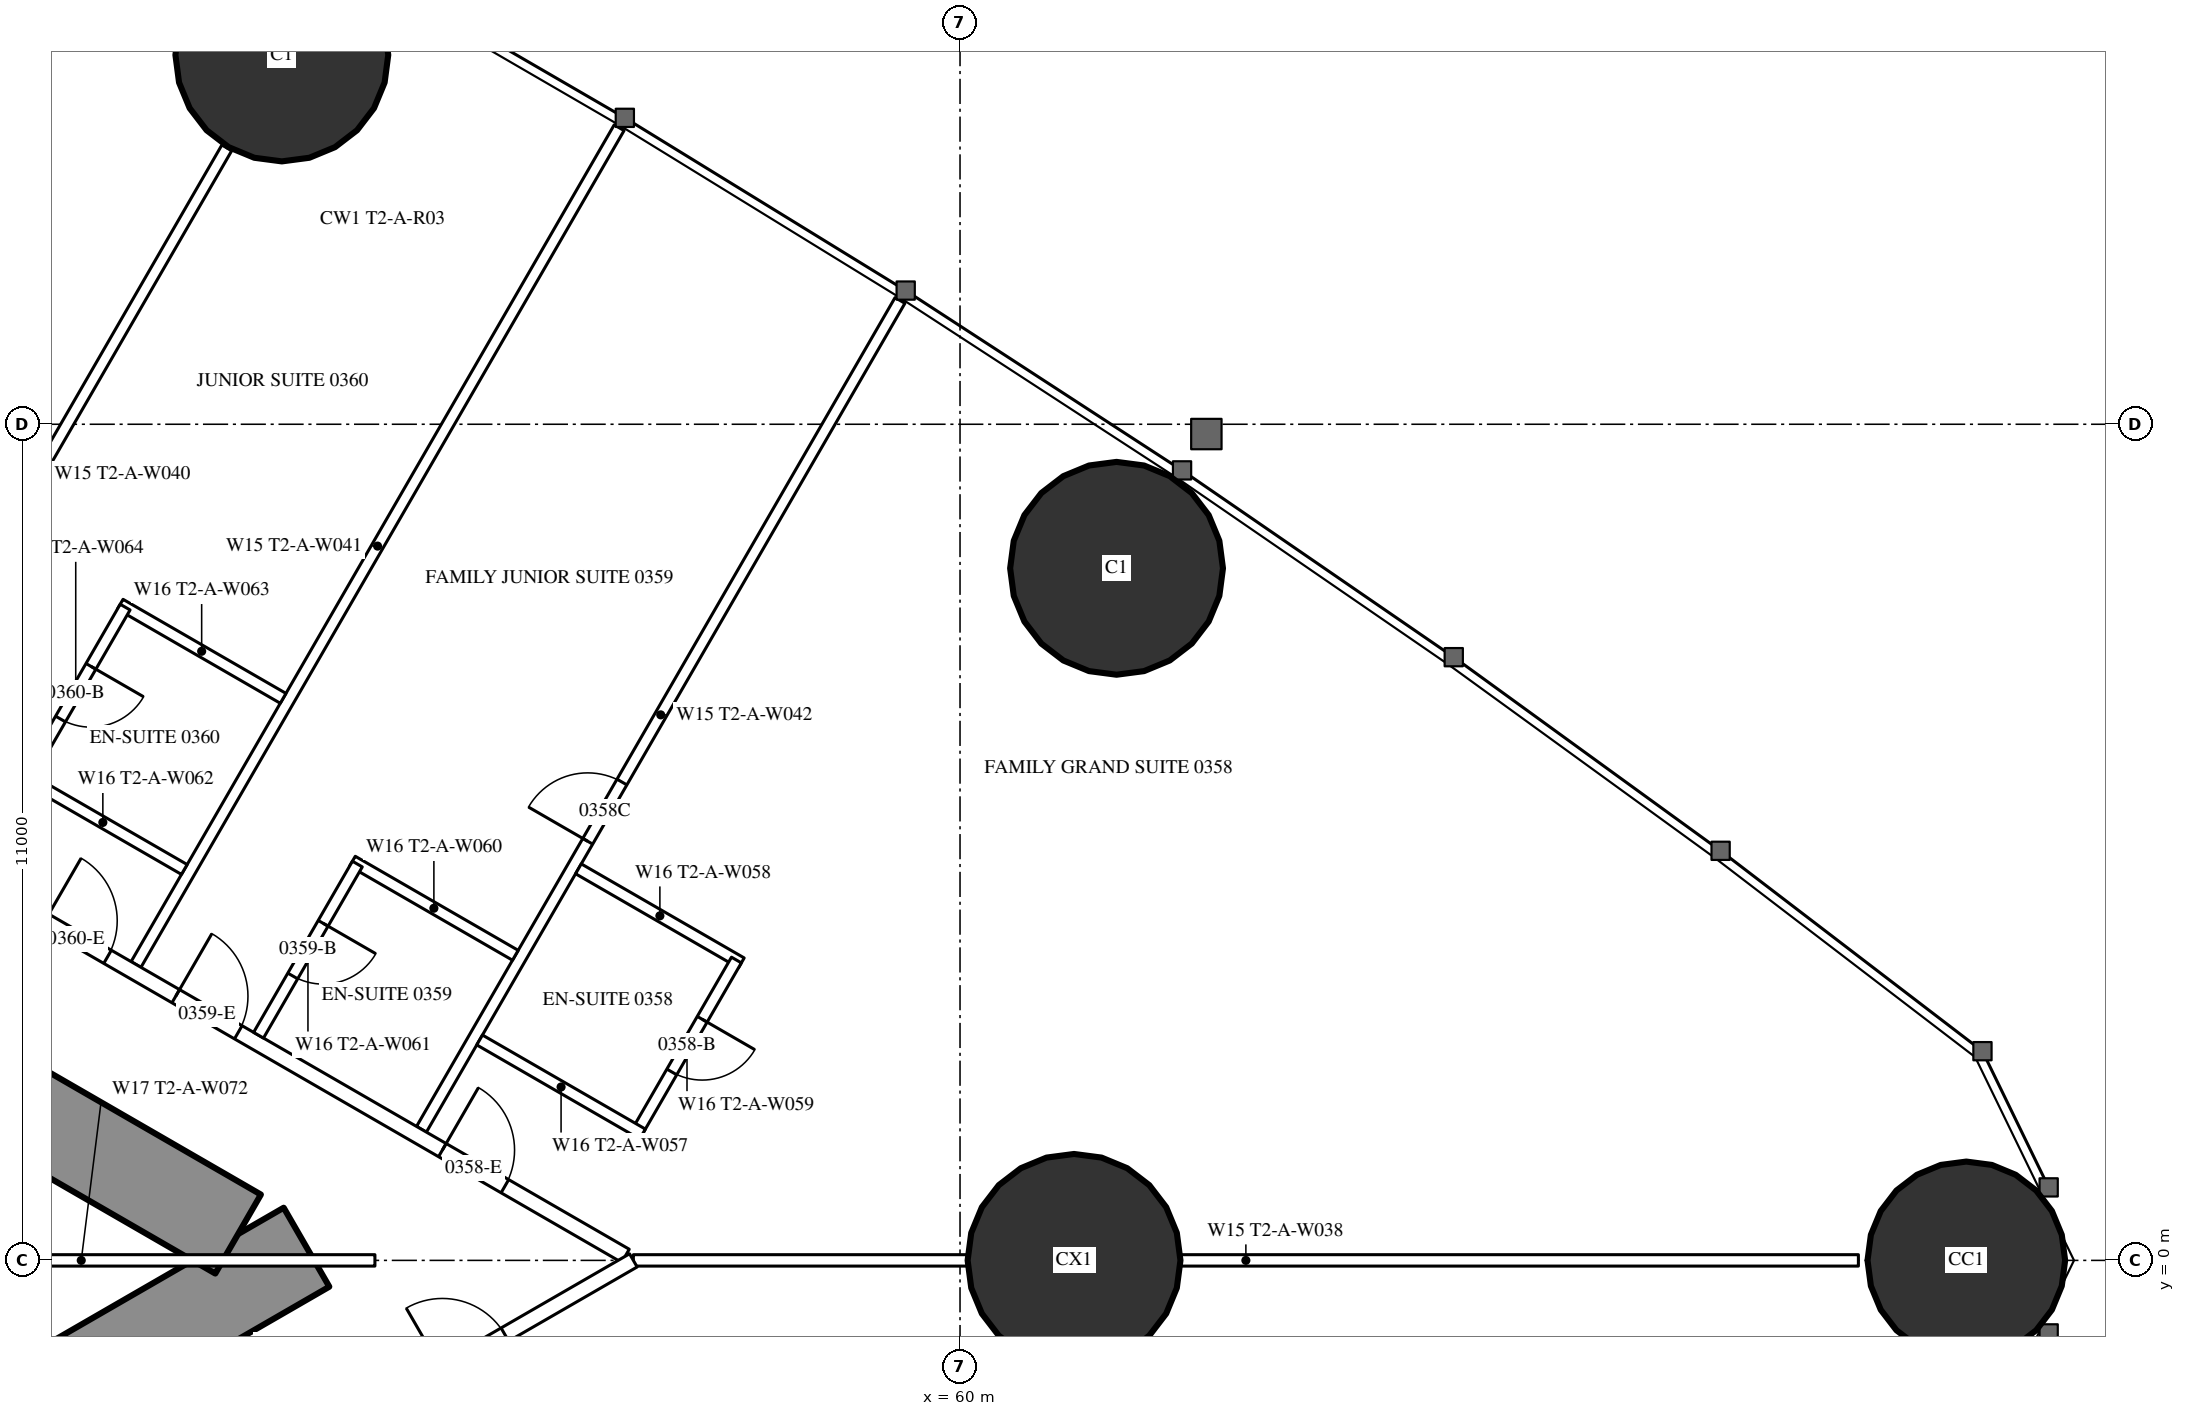
"""IFC4 building model, lengths in metres.
Left out: names, types, materials, properties, quantities, classifications, styles, units other than length and angle.
Written with IfcOpenShell. Run it as: python <this file> out.ifc"""

import sys

from ifc_helpers import new_model, si_unit, direction, frame, frame_2d, origin, origin_2d, place, context, subcontext, project, spatial, rectangle, hollow_circle, extrude, element, fill, save


model = new_model("IFC4")
c1 = context("Model", 3, precision=1e-05, world=origin(), true_north=direction((0.0, 1.0)))
c2 = subcontext(c1, "Body", "Model", "MODEL_VIEW")
j1 = project(units=[si_unit("LENGTHUNIT", "METRE"), si_unit("PLANEANGLEUNIT", "RADIAN")], contexts=[c1])
p1 = place(None, origin())
s1 = spatial("IfcSite", under=j1, at=p1, CompositionType="ELEMENT")
p2 = place(p1, origin())
s2 = spatial("IfcBuilding", under=s1, at=p2, CompositionType="ELEMENT")
p3 = place(p2, frame((0.0, 0.0, 18.0)))
s3 = spatial("IfcBuildingStorey", under=s2, at=p3, CompositionType="ELEMENT", Elevation=18.0)
p4 = place(p3, frame((73.239, 0.0, 0.0), z_axis=(0.0, 0.0, 1.0), x_axis=(1.0, 0.0, 0.0)))
e1 = element("IfcColumn", 1, at=p4, inside=s3, PredefinedType="COLUMN", context=c2, shape_type="SweptSolid", body=[
    extrude(hollow_circle(Radius=1.3, WallThickness=0.1, at=origin_2d()), origin(), (0.0, 0.0, 1.0), 3.5),
])
for number, where, z_axis, x_axis in (
    (2, (62.059, 9.105, 0.0), (0.0, 0.0, 1.0), (1.0, 0.0, 0.0)),
    (3, (51.078, 15.858, 0.0), (0.0, 0.0, 1.0), (1.0, 0.0, 0.0)),
):
    element("IfcColumn", number, at=place(p3, frame(where, z_axis=z_axis, x_axis=x_axis)), inside=s3, PredefinedType="COLUMN", context=c2, shape_type="SweptSolid", body=[
        extrude(hollow_circle(Radius=1.4, WallThickness=0.12, at=origin_2d()), origin(), (0.0, 0.0, 1.0), 3.5),
    ])
p5 = place(p3, frame((61.5, 0.0, 0.0), z_axis=(0.0, 0.0, 1.0), x_axis=(1.0, 0.0, 0.0)))
e4 = element("IfcColumn", 4, at=p5, inside=s3, PredefinedType="COLUMN", context=c2, shape_type="SweptSolid", body=[
    extrude(hollow_circle(Radius=1.4, WallThickness=0.1, at=origin_2d()), origin(), (0.0, 0.0, 1.0), 3.5),
])
p6 = place(p3, frame((27.2, -13.8, 0.0), z_axis=(0.0, 0.0, 1.0), x_axis=(0.866027159892, 0.499996958321, 0.0)))
e5 = element("IfcWall", 5, at=p6, inside=s3, PredefinedType="SHEAR", context=c2, shape_type="SweptSolid", body=[
    extrude(rectangle(XDim=27.947, YDim=1.2, at=frame_2d((13.973, 0.0))), origin(), (0.0, 0.0, 1.0), 3.5),
])
p7 = place(p6, frame((4.6, 0.0, 0.0)))
e6 = element("IfcOpeningElement", 6, at=p7, cuts=e5, PredefinedType="OPENING", context=c2, shape_type="SweptSolid", body=[
    extrude(rectangle(XDim=1.0, YDim=2.2, at=frame_2d((0.5, 1.1))), frame((0.0, 0.61, 0.0), z_axis=(0.0, -1.0, 0.0), x_axis=(1.0, 0.0, 0.0)), (0.0, 0.0, 1.0), 1.22),
])
p8 = place(p6, frame((13.395, 0.0, 0.0)))
e7 = element("IfcOpeningElement", 7, at=p8, cuts=e5, PredefinedType="OPENING", context=c2, shape_type="SweptSolid", body=[
    extrude(rectangle(XDim=1.8, YDim=2.2, at=frame_2d((0.9, 1.1))), frame((0.0, 0.61, 0.0), z_axis=(0.0, -1.0, 0.0), x_axis=(1.0, 0.0, 0.0)), (0.0, 0.0, 1.0), 1.22),
])
p9 = place(p3, frame((27.2, 13.8, 0.0), z_axis=(0.0, 0.0, 1.0), x_axis=(0.866024515034, -0.500001539357, 0.0)))
e8 = element("IfcWall", 8, at=p9, inside=s3, PredefinedType="SHEAR", context=c2, shape_type="SweptSolid", body=[
    extrude(rectangle(XDim=26.907, YDim=1.2, at=frame_2d((13.454, 0.0))), origin(), (0.0, 0.0, 1.0), 3.5),
])
p10 = place(p9, frame((4.6, 0.0, 0.0)))
e9 = element("IfcOpeningElement", 9, at=p10, cuts=e8, PredefinedType="OPENING", context=c2, shape_type="SweptSolid", body=[
    extrude(rectangle(XDim=1.0, YDim=2.2, at=frame_2d((0.5, 1.1))), frame((0.0, 0.61, 0.0), z_axis=(0.0, -1.0, 0.0), x_axis=(1.0, 0.0, 0.0)), (0.0, 0.0, 1.0), 1.22),
])
p11 = place(p9, frame((13.395, 0.0, 0.0)))
e10 = element("IfcOpeningElement", 10, at=p11, cuts=e8, PredefinedType="OPENING", context=c2, shape_type="SweptSolid", body=[
    extrude(rectangle(XDim=1.8, YDim=2.2, at=frame_2d((0.9, 1.1))), frame((0.0, 0.61, 0.0), z_axis=(0.0, -1.0, 0.0), x_axis=(1.0, 0.0, 0.0)), (0.0, 0.0, 1.0), 1.22),
])
p12 = place(p3, frame((45.403, 6.062, 0.0), z_axis=(0.0, 0.0, 1.0), x_axis=(0.500013434677, 0.866017647131, 0.0)))
e11 = element("IfcWall", 11, at=p12, inside=s3, PredefinedType="PARTITIONING", context=c2, shape_type="SweptSolid", body=[
    extrude(rectangle(XDim=9.902, YDim=0.15, at=frame_2d((4.951, 0.0))), origin(), (0.0, 0.0, 1.0), 2.25),
])
p13 = place(p3, frame((49.159, 3.893, 0.0), z_axis=(0.0, 0.0, 1.0), x_axis=(0.499995664361, 0.866027906952, 0.0)))
e12 = element("IfcWall", 12, at=p13, inside=s3, PredefinedType="PARTITIONING", context=c2, shape_type="SweptSolid", body=[
    extrude(rectangle(XDim=12.711, YDim=0.15, at=frame_2d((6.356, 0.0))), origin(), (0.0, 0.0, 1.0), 3.25),
])
p14 = place(p3, frame((52.915, 1.725, 0.0), z_axis=(0.0, 0.0, 1.0), x_axis=(0.499997163113, 0.866027041656, 0.0)))
e13 = element("IfcWall", 13, at=p14, inside=s3, PredefinedType="PARTITIONING", context=c2, shape_type="SweptSolid", body=[
    extrude(rectangle(XDim=12.591, YDim=0.15, at=frame_2d((6.295, 0.0))), origin(), (0.0, 0.0, 1.0), 3.25),
])
p15 = place(p14, frame((4.375, 0.0, 0.0)))
e14 = element("IfcOpeningElement", 14, at=p15, cuts=e13, PredefinedType="OPENING", context=c2, shape_type="SweptSolid", body=[
    extrude(rectangle(XDim=0.9, YDim=2.2, at=frame_2d((0.45, 1.1))), frame((0.0, 0.085, 0.0), z_axis=(0.0, -1.0, 0.0), x_axis=(1.0, 0.0, 0.0)), (0.0, 0.0, 1.0), 0.17),
])
p16 = place(p3, frame((55.702, 0.0, 0.0), z_axis=(0.0, 0.0, 1.0), x_axis=(1.0, 0.0, 0.0)))
e15 = element("IfcWall", 15, at=p16, inside=s3, PredefinedType="PARTITIONING", context=c2, shape_type="SweptSolid", body=[
    extrude(rectangle(XDim=16.117, YDim=0.15, at=frame_2d((8.059, 0.0))), origin(), (0.0, 0.0, 1.0), 2.25),
])
p17 = place(p3, frame((36.834, 10.894, 0.0), z_axis=(0.0, 0.0, 1.0), x_axis=(0.866028157229, -0.499995230863, 0.0)))
e16 = element("IfcWall", 16, at=p17, inside=s3, PredefinedType="PARTITIONING", context=c2, shape_type="SweptSolid", body=[
    extrude(rectangle(XDim=21.667, YDim=0.2, at=frame_2d((10.833, 0.0))), origin(), (0.0, 0.0, 1.0), 3.25),
])
p18 = place(p17, frame((18.885, 0.0, 0.0)))
e17 = element("IfcOpeningElement", 17, at=p18, cuts=e16, PredefinedType="OPENING", context=c2, shape_type="SweptSolid", body=[
    extrude(rectangle(XDim=0.95, YDim=2.2, at=frame_2d((0.475, 1.1))), frame((0.0, 0.11, 0.0), z_axis=(0.0, -1.0, 0.0), x_axis=(1.0, 0.0, 0.0)), (0.0, 0.0, 1.0), 0.22),
])
p19 = place(p17, frame((14.835, 0.0, 0.0)))
e18 = element("IfcOpeningElement", 18, at=p19, cuts=e16, PredefinedType="OPENING", context=c2, shape_type="SweptSolid", body=[
    extrude(rectangle(XDim=0.95, YDim=2.2, at=frame_2d((0.475, 1.1))), frame((0.0, 0.11, 0.0), z_axis=(0.0, -1.0, 0.0), x_axis=(1.0, 0.0, 0.0)), (0.0, 0.0, 1.0), 0.22),
])
p20 = place(p17, frame((12.85, 0.0, 0.0)))
e19 = element("IfcOpeningElement", 19, at=p20, cuts=e16, PredefinedType="OPENING", context=c2, shape_type="SweptSolid", body=[
    extrude(rectangle(XDim=0.95, YDim=2.2, at=frame_2d((0.475, 1.1))), frame((0.0, 0.11, 0.0), z_axis=(0.0, -1.0, 0.0), x_axis=(1.0, 0.0, 0.0)), (0.0, 0.0, 1.0), 0.22),
])
p21 = place(p17, frame((1.542, 0.0, 0.0)))
e20 = element("IfcOpeningElement", 20, at=p21, cuts=e16, PredefinedType="OPENING", context=c2, shape_type="SweptSolid", body=[
    extrude(rectangle(XDim=0.95, YDim=2.2, at=frame_2d((0.475, 1.1))), frame((0.0, 0.11, 0.0), z_axis=(0.0, -1.0, 0.0), x_axis=(1.0, 0.0, 0.0)), (0.0, 0.0, 1.0), 0.22),
])
p22 = place(p3, frame((49.131, -3.794, 0.0), z_axis=(0.0, 0.0, 1.0), x_axis=(0.866030732979, 0.499990769451, 0.0)))
e21 = element("IfcWall", 21, at=p22, inside=s3, PredefinedType="PARTITIONING", context=c2, shape_type="SweptSolid", body=[
    extrude(rectangle(XDim=7.588, YDim=0.2, at=frame_2d((3.794, 0.0))), origin(), (0.0, 0.0, 1.0), 3.25),
])
p23 = place(p22, frame((2.986, 0.0, 0.0)))
e22 = element("IfcOpeningElement", 22, at=p23, cuts=e21, PredefinedType="OPENING", context=c2, shape_type="SweptSolid", body=[
    extrude(rectangle(XDim=0.95, YDim=2.2, at=frame_2d((0.475, 1.1))), frame((0.0, 0.11, 0.0), z_axis=(0.0, -1.0, 0.0), x_axis=(1.0, 0.0, 0.0)), (0.0, 0.0, 1.0), 0.22),
])
p24 = place(p22, frame((4.686, 0.0, 0.0)))
e23 = element("IfcOpeningElement", 23, at=p24, cuts=e21, PredefinedType="OPENING", context=c2, shape_type="SweptSolid", body=[
    extrude(rectangle(XDim=0.95, YDim=2.2, at=frame_2d((0.475, 1.1))), frame((0.0, 0.11, 0.0), z_axis=(0.0, -1.0, 0.0), x_axis=(1.0, 0.0, 0.0)), (0.0, 0.0, 1.0), 0.22),
])
p25 = place(p3, frame((54.98, 5.151, 0.0), z_axis=(0.0, 0.0, 1.0), x_axis=(0.86604923931, -0.499958713387, 0.0)))
e24 = element("IfcWall", 24, at=p25, inside=s3, PredefinedType="PARTITIONING", context=c2, shape_type="SweptSolid", body=[
    extrude(rectangle(XDim=2.475, YDim=0.15, at=frame_2d((1.237, 0.0))), origin(), (0.0, 0.0, 1.0), 3.25),
])
p26 = place(p3, frame((55.758, 1.7, 0.0), z_axis=(0.0, 0.0, 1.0), x_axis=(0.500006934395, 0.866021400173, 0.0)))
e25 = element("IfcWall", 25, at=p26, inside=s3, PredefinedType="PARTITIONING", context=c2, shape_type="SweptSolid", body=[
    extrude(rectangle(XDim=2.6, YDim=0.15, at=frame_2d((1.3, 0.0))), origin(), (0.0, 0.0, 1.0), 3.25),
])
p27 = place(p26, frame((0.9, 0.0, 0.0)))
e26 = element("IfcOpeningElement", 26, at=p27, cuts=e25, PredefinedType="OPENING", context=c2, shape_type="SweptSolid", body=[
    extrude(rectangle(XDim=0.8, YDim=2.2, at=frame_2d((0.4, 1.1))), frame((0.0, 0.085, 0.0), z_axis=(0.0, -1.0, 0.0), x_axis=(1.0, 0.0, 0.0)), (0.0, 0.0, 1.0), 0.17),
])
for number, where, z_axis, x_axis in (
    (27, (53.68, 2.9, 0.0), (0.0, 0.0, 1.0), (0.866, -0.5, 0.0)),
    (28, (52.006, 5.251, 0.0), (0.0, 0.0, 1.0), (0.866, -0.5, 0.0)),
):
    element("IfcWall", number, at=place(p3, frame(where, z_axis=z_axis, x_axis=x_axis)), inside=s3, PredefinedType="PARTITIONING", context=c2, shape_type="SweptSolid", body=[
        extrude(rectangle(XDim=2.475, YDim=0.15, at=frame_2d((1.237, 0.0))), origin(), (0.0, 0.0, 1.0), 3.25),
    ])
p28 = place(p3, frame((50.771, 2.962, 0.0), z_axis=(0.0, 0.0, 1.0), x_axis=(0.500006934395, 0.866021400173, 0.0)))
e29 = element("IfcWall", 29, at=p28, inside=s3, PredefinedType="PARTITIONING", context=c2, shape_type="SweptSolid", body=[
    extrude(rectangle(XDim=2.6, YDim=0.15, at=frame_2d((1.3, 0.0))), origin(), (0.0, 0.0, 1.0), 3.25),
])
p29 = place(p28, frame((0.9, 0.0, 0.0)))
e30 = element("IfcOpeningElement", 30, at=p29, cuts=e29, PredefinedType="OPENING", context=c2, shape_type="SweptSolid", body=[
    extrude(rectangle(XDim=0.8, YDim=2.2, at=frame_2d((0.4, 1.1))), frame((0.0, 0.085, 0.0), z_axis=(0.0, -1.0, 0.0), x_axis=(1.0, 0.0, 0.0)), (0.0, 0.0, 1.0), 0.17),
])
p30 = place(p3, frame((48.951, 8.632, 0.0), z_axis=(0.0, 0.0, 1.0), x_axis=(0.866006523861, -0.500032699561, 0.0)))
e31 = element("IfcWall", 31, at=p30, inside=s3, PredefinedType="PARTITIONING", context=c2, shape_type="SweptSolid", body=[
    extrude(rectangle(XDim=2.475, YDim=0.15, at=frame_2d((1.237, 0.0))), origin(), (0.0, 0.0, 1.0), 3.25),
])
p31 = place(p3, frame((47.716, 6.343, 0.0), z_axis=(0.0, 0.0, 1.0), x_axis=(0.500006934395, 0.866021400173, 0.0)))
e32 = element("IfcWall", 32, at=p31, inside=s3, PredefinedType="PARTITIONING", context=c2, shape_type="SweptSolid", body=[
    extrude(rectangle(XDim=2.6, YDim=0.15, at=frame_2d((1.3, 0.0))), origin(), (0.0, 0.0, 1.0), 3.25),
])
p32 = place(p31, frame((0.9, 0.0, 0.0)))
e33 = element("IfcOpeningElement", 33, at=p32, cuts=e32, PredefinedType="OPENING", context=c2, shape_type="SweptSolid", body=[
    extrude(rectangle(XDim=0.8, YDim=2.2, at=frame_2d((0.4, 1.1))), frame((0.0, 0.085, 0.0), z_axis=(0.0, -1.0, 0.0), x_axis=(1.0, 0.0, 0.0)), (0.0, 0.0, 1.0), 0.17),
])
p33 = place(p3, frame((47.651, 6.38, 0.0), z_axis=(0.0, 0.0, 1.0), x_axis=(0.866031185235, -0.4999899861, 0.0)))
e34 = element("IfcWall", 34, at=p33, inside=s3, PredefinedType="PARTITIONING", context=c2, shape_type="SweptSolid", body=[
    extrude(rectangle(XDim=2.475, YDim=0.15, at=frame_2d((1.238, 0.0))), origin(), (0.0, 0.0, 1.0), 3.25),
])
p34 = place(p3, frame((44.575, 0.0, 0.0), z_axis=(0.0, 0.0, 1.0), x_axis=(1.0, 0.0, 0.0)))
e35 = element("IfcWall", 35, at=p34, inside=s3, PredefinedType="PARTITIONING", context=c2, shape_type="SweptSolid", body=[
    extrude(rectangle(XDim=7.727, YDim=0.15, at=frame_2d((3.864, 0.0))), origin(), (0.0, 0.0, 1.0), 2.25),
])
p35 = place(p24, origin())
e36 = element("IfcDoor", 36, at=p35, inside=s3, OperationType="SINGLE_SWING_LEFT", PredefinedType="DOOR", context=c2, shape_type="SweptSolid", body=[
    extrude(rectangle(XDim=0.95, YDim=2.2, at=frame_2d((0.475, 1.1))), frame((0.0, 0.025, 0.0), z_axis=(0.0, -1.0, 0.0), x_axis=(1.0, 0.0, 0.0)), (0.0, 0.0, 1.0), 0.05),
])
fill(e23, e36)
p36 = place(p27, origin())
e37 = element("IfcDoor", 37, at=p36, inside=s3, OperationType="SINGLE_SWING_RIGHT", PredefinedType="DOOR", context=c2, shape_type="SweptSolid", body=[
    extrude(rectangle(XDim=0.8, YDim=2.2, at=frame_2d((0.4, 1.1))), frame((0.0, 0.025, 0.0), z_axis=(0.0, -1.0, 0.0), x_axis=(1.0, 0.0, 0.0)), (0.0, 0.0, 1.0), 0.05),
])
fill(e26, e37)
p37 = place(p18, origin())
e38 = element("IfcDoor", 38, at=p37, inside=s3, OperationType="SINGLE_SWING_LEFT", PredefinedType="DOOR", context=c2, shape_type="SweptSolid", body=[
    extrude(rectangle(XDim=0.95, YDim=2.2, at=frame_2d((0.475, 1.1))), frame((0.0, 0.025, 0.0), z_axis=(0.0, -1.0, 0.0), x_axis=(1.0, 0.0, 0.0)), (0.0, 0.0, 1.0), 0.05),
])
fill(e17, e38)
p38 = place(p29, origin())
e39 = element("IfcDoor", 39, at=p38, inside=s3, OperationType="SINGLE_SWING_RIGHT", PredefinedType="DOOR", context=c2, shape_type="SweptSolid", body=[
    extrude(rectangle(XDim=0.8, YDim=2.2, at=frame_2d((0.4, 1.1))), frame((0.0, 0.025, 0.0), z_axis=(0.0, -1.0, 0.0), x_axis=(1.0, 0.0, 0.0)), (0.0, 0.0, 1.0), 0.05),
])
fill(e30, e39)
p39 = place(p19, origin())
e40 = element("IfcDoor", 40, at=p39, inside=s3, OperationType="SINGLE_SWING_LEFT", PredefinedType="DOOR", context=c2, shape_type="SweptSolid", body=[
    extrude(rectangle(XDim=0.95, YDim=2.2, at=frame_2d((0.475, 1.1))), frame((0.0, 0.025, 0.0), z_axis=(0.0, -1.0, 0.0), x_axis=(1.0, 0.0, 0.0)), (0.0, 0.0, 1.0), 0.05),
])
fill(e18, e40)
p40 = place(p32, origin())
e41 = element("IfcDoor", 41, at=p40, inside=s3, OperationType="SINGLE_SWING_RIGHT", PredefinedType="DOOR", context=c2, shape_type="SweptSolid", body=[
    extrude(rectangle(XDim=0.8, YDim=2.2, at=frame_2d((0.4, 1.1))), frame((0.0, 0.025, 0.0), z_axis=(0.0, -1.0, 0.0), x_axis=(1.0, 0.0, 0.0)), (0.0, 0.0, 1.0), 0.05),
])
fill(e33, e41)
p41 = place(p20, origin())
e42 = element("IfcDoor", 42, at=p41, inside=s3, OperationType="SINGLE_SWING_LEFT", PredefinedType="DOOR", context=c2, shape_type="SweptSolid", body=[
    extrude(rectangle(XDim=0.95, YDim=2.2, at=frame_2d((0.475, 1.1))), frame((0.0, 0.025, 0.0), z_axis=(0.0, -1.0, 0.0), x_axis=(1.0, 0.0, 0.0)), (0.0, 0.0, 1.0), 0.05),
])
fill(e19, e42)
p42 = place(p15, origin())
e43 = element("IfcDoor", 43, at=p42, inside=s3, OperationType="SINGLE_SWING_LEFT", PredefinedType="DOOR", context=c2, shape_type="SweptSolid", body=[
    extrude(rectangle(XDim=0.9, YDim=2.2, at=frame_2d((0.45, 1.1))), frame((0.0, 0.025, 0.0), z_axis=(0.0, -1.0, 0.0), x_axis=(1.0, 0.0, 0.0)), (0.0, 0.0, 1.0), 0.05),
])
fill(e14, e43)
save(model, sys.argv[1])
